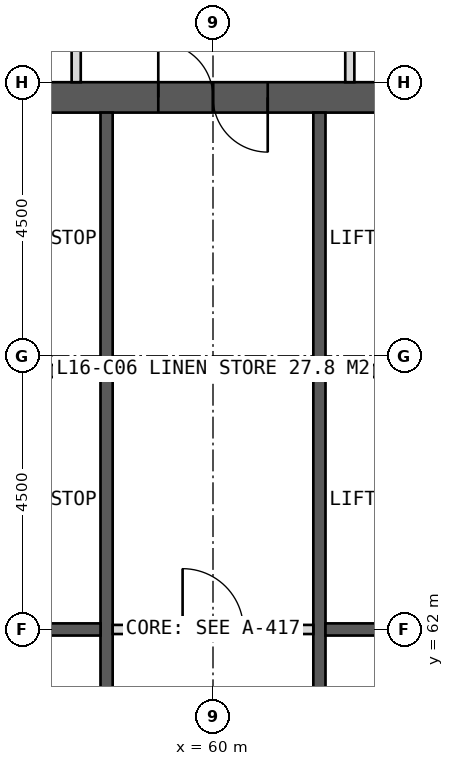
"""IFC4 building model, lengths in metres.
Left out: names, types, materials, properties, quantities, classifications, styles, units other than length and angle.
Written with IfcOpenShell. Run it as: python <this file> out.ifc"""

import sys

from ifc_helpers import new_model, si_unit, direction, frame, frame_2d, origin, place, context, subcontext, project, spatial, rectangle, extrude, element, fill, save


model = new_model("IFC4")
c1 = context("Model", 3, precision=1e-05, world=origin(), true_north=direction((0.0, 1.0)))
c2 = subcontext(c1, "Body", "Model", "MODEL_VIEW")
j1 = project(units=[si_unit("LENGTHUNIT", "METRE"), si_unit("PLANEANGLEUNIT", "RADIAN")], contexts=[c1])
p1 = place(None, origin())
s1 = spatial("IfcSite", under=j1, at=p1, CompositionType="ELEMENT")
p2 = place(p1, origin())
s2 = spatial("IfcBuilding", under=s1, at=p2, CompositionType="ELEMENT")
p3 = place(p2, frame((0.0, 0.0, 71.0)))
s3 = spatial("IfcBuildingStorey", under=s2, at=p3, CompositionType="ELEMENT", Elevation=71.0)
p4 = place(p3, frame((51.0, 70.75, 0.0), z_axis=(0.0, 0.0, 1.0), x_axis=(1.0, 0.0, 0.0)))
e1 = element("IfcWall", 1, at=p4, inside=s3, PredefinedType="SHEAR", context=c2, shape_type="SweptSolid", body=[
    extrude(rectangle(XDim=18.0, YDim=0.5, at=frame_2d((9.0, 0.0))), origin(), (0.0, 0.0, 1.0), 4.0),
])
p5 = place(p4, frame((8.1, 0.0, 0.0)))
e2 = element("IfcOpeningElement", 2, at=p5, cuts=e1, PredefinedType="OPENING", context=c2, shape_type="SweptSolid", body=[
    extrude(rectangle(XDim=1.8, YDim=2.2, at=frame_2d((0.9, 1.1))), frame((0.0, 0.26, 0.0), z_axis=(0.0, -1.0, 0.0), x_axis=(1.0, 0.0, 0.0)), (0.0, 0.0, 1.0), 0.52),
])
p6 = place(p3, frame((58.25, 53.5, 0.0), z_axis=(0.0, 0.0, 1.0), x_axis=(0.0, 1.0, 0.0)))
e3 = element("IfcWall", 3, at=p6, inside=s3, PredefinedType="SHEAR", context=c2, shape_type="SweptSolid", body=[
    extrude(rectangle(XDim=17.0, YDim=0.2, at=frame_2d((8.5, 0.0))), origin(), (0.0, 0.0, 1.0), 4.0),
])
p7 = place(p6, frame((1.375, 0.0, 0.0)))
e4 = element("IfcOpeningElement", 4, at=p7, cuts=e3, PredefinedType="OPENING", context=c2, shape_type="SweptSolid", body=[
    extrude(rectangle(XDim=1.4, YDim=2.2, at=frame_2d((0.7, 1.1))), frame((0.0, 0.11, 0.0), z_axis=(0.0, -1.0, 0.0), x_axis=(1.0, 0.0, 0.0)), (0.0, 0.0, 1.0), 0.22),
])
p8 = place(p6, frame((5.675, 0.0, 0.0)))
e5 = element("IfcOpeningElement", 5, at=p8, cuts=e3, PredefinedType="OPENING", context=c2, shape_type="SweptSolid", body=[
    extrude(rectangle(XDim=1.4, YDim=2.2, at=frame_2d((0.7, 1.1))), frame((0.0, 0.11, 0.0), z_axis=(0.0, -1.0, 0.0), x_axis=(1.0, 0.0, 0.0)), (0.0, 0.0, 1.0), 0.22),
])
p9 = place(p3, frame((61.75, 53.5, 0.0), z_axis=(0.0, 0.0, 1.0), x_axis=(0.0, 1.0, 0.0)))
e6 = element("IfcWall", 6, at=p9, inside=s3, PredefinedType="SHEAR", context=c2, shape_type="SweptSolid", body=[
    extrude(rectangle(XDim=17.0, YDim=0.2, at=frame_2d((8.5, 0.0))), origin(), (0.0, 0.0, 1.0), 4.0),
])
p10 = place(p9, frame((1.375, 0.0, 0.0)))
e7 = element("IfcOpeningElement", 7, at=p10, cuts=e6, PredefinedType="OPENING", context=c2, shape_type="SweptSolid", body=[
    extrude(rectangle(XDim=1.4, YDim=2.2, at=frame_2d((0.7, 1.1))), frame((0.0, 0.11, 0.0), z_axis=(0.0, -1.0, 0.0), x_axis=(1.0, 0.0, 0.0)), (0.0, 0.0, 1.0), 0.22),
])
p11 = place(p9, frame((5.675, 0.0, 0.0)))
e8 = element("IfcOpeningElement", 8, at=p11, cuts=e6, PredefinedType="OPENING", context=c2, shape_type="SweptSolid", body=[
    extrude(rectangle(XDim=1.4, YDim=2.2, at=frame_2d((0.7, 1.1))), frame((0.0, 0.11, 0.0), z_axis=(0.0, -1.0, 0.0), x_axis=(1.0, 0.0, 0.0)), (0.0, 0.0, 1.0), 0.22),
])
for number, where, z_axis, x_axis in (
    (9, (55.1, 62.0, 0.0), (0.0, 0.0, 1.0), (1.0, 0.0, 0.0)),
    (10, (61.85, 62.0, 0.0), (0.0, 0.0, 1.0), (1.0, 0.0, 0.0)),
    (11, (55.1, 66.25, 0.0), (0.0, 0.0, 1.0), (1.0, 0.0, 0.0)),
    (12, (61.85, 66.25, 0.0), (0.0, 0.0, 1.0), (1.0, 0.0, 0.0)),
):
    element("IfcWall", number, at=place(p3, frame(where, z_axis=z_axis, x_axis=x_axis)), inside=s3, PredefinedType="SHEAR", context=c2, shape_type="SweptSolid", body=[
        extrude(rectangle(XDim=3.05, YDim=0.2, at=frame_2d((1.525, 0.0))), origin(), (0.0, 0.0, 1.0), 4.0),
    ])
p12 = place(p3, frame((57.75, 71.0, 0.0), z_axis=(0.0, 0.0, 1.0), x_axis=(0.0, 1.0, 0.0)))
e13 = element("IfcWall", 13, at=p12, inside=s3, PredefinedType="PARTITIONING", context=c2, shape_type="SweptSolid", body=[
    extrude(rectangle(XDim=6.3, YDim=0.15, at=frame_2d((3.15, 0.0))), origin(), (0.0, 0.0, 1.0), 3.75),
])
p13 = place(p12, frame((0.6, 0.0, 0.0)))
e14 = element("IfcOpeningElement", 14, at=p13, cuts=e13, PredefinedType="OPENING", context=c2, shape_type="SweptSolid", body=[
    extrude(rectangle(XDim=0.9, YDim=2.1, at=frame_2d((0.45, 1.05))), frame((0.0, 0.085, 0.0), z_axis=(0.0, -1.0, 0.0), x_axis=(1.0, 0.0, 0.0)), (0.0, 0.0, 1.0), 0.17),
])
p14 = place(p3, frame((62.25, 71.0, 0.0), z_axis=(0.0, 0.0, 1.0), x_axis=(0.0, 1.0, 0.0)))
e15 = element("IfcWall", 15, at=p14, inside=s3, PredefinedType="PARTITIONING", context=c2, shape_type="SweptSolid", body=[
    extrude(rectangle(XDim=6.3, YDim=0.15, at=frame_2d((3.15, 0.0))), origin(), (0.0, 0.0, 1.0), 3.75),
])
p15 = place(p14, frame((0.6, 0.0, 0.0)))
e16 = element("IfcOpeningElement", 16, at=p15, cuts=e15, PredefinedType="OPENING", context=c2, shape_type="SweptSolid", body=[
    extrude(rectangle(XDim=0.9, YDim=2.1, at=frame_2d((0.45, 1.05))), frame((0.0, 0.085, 0.0), z_axis=(0.0, -1.0, 0.0), x_axis=(1.0, 0.0, 0.0)), (0.0, 0.0, 1.0), 0.17),
])
p16 = place(p3, frame((58.35, 62.0, 0.0), z_axis=(0.0, 0.0, 1.0), x_axis=(1.0, 0.0, 0.0)))
e17 = element("IfcWall", 17, at=p16, inside=s3, PredefinedType="PARTITIONING", context=c2, shape_type="SweptSolid", body=[
    extrude(rectangle(XDim=3.3, YDim=0.15, at=frame_2d((1.65, 0.0))), origin(), (0.0, 0.0, 1.0), 3.75),
])
p17 = place(p16, frame((1.15, 0.0, 0.0)))
e18 = element("IfcOpeningElement", 18, at=p17, cuts=e17, PredefinedType="OPENING", context=c2, shape_type="SweptSolid", body=[
    extrude(rectangle(XDim=1.0, YDim=2.1, at=frame_2d((0.5, 1.05))), frame((0.0, 0.085, 0.0), z_axis=(0.0, -1.0, 0.0), x_axis=(1.0, 0.0, 0.0)), (0.0, 0.0, 1.0), 0.17),
])
p18 = place(p17, origin())
e19 = element("IfcDoor", 19, at=p18, inside=s3, OperationType="SINGLE_SWING_LEFT", PredefinedType="DOOR", context=c2, shape_type="SweptSolid", body=[
    extrude(rectangle(XDim=1.0, YDim=2.1, at=frame_2d((0.5, 1.05))), frame((0.0, 0.025, 0.0), z_axis=(0.0, -1.0, 0.0), x_axis=(1.0, 0.0, 0.0)), (0.0, 0.0, 1.0), 0.05),
])
fill(e18, e19)
p19 = place(p5, origin())
e20 = element("IfcDoor", 20, at=p19, inside=s3, OperationType="DOUBLE_DOOR_SINGLE_SWING", PredefinedType="DOOR", context=c2, shape_type="SweptSolid", body=[
    extrude(rectangle(XDim=1.8, YDim=2.2, at=frame_2d((0.9, 1.1))), frame((0.0, 0.025, 0.0), z_axis=(0.0, -1.0, 0.0), x_axis=(1.0, 0.0, 0.0)), (0.0, 0.0, 1.0), 0.05),
])
fill(e2, e20)
save(model, sys.argv[1])
